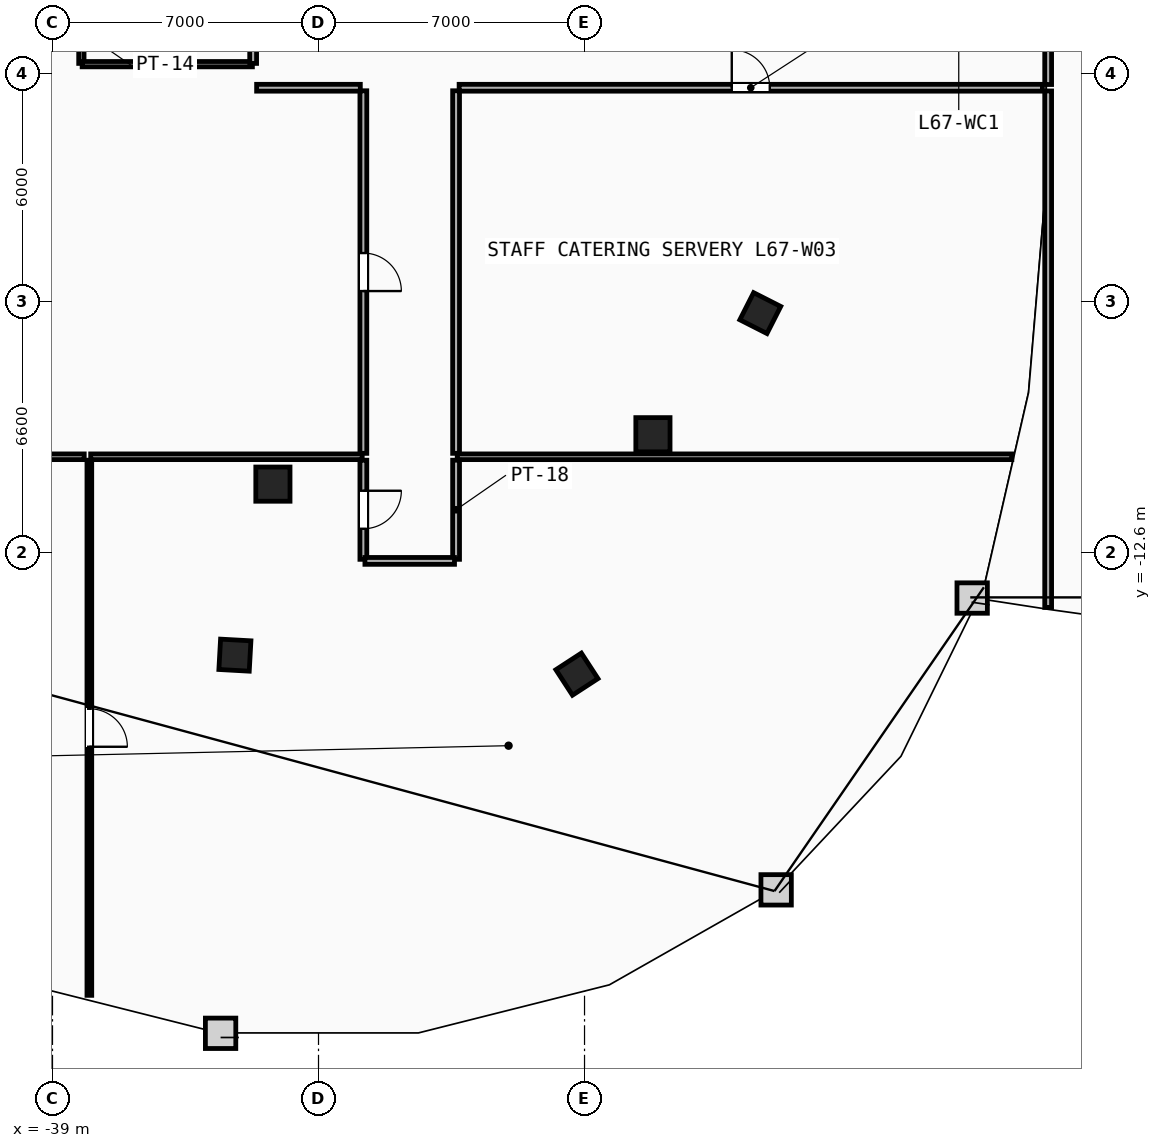
"""IFC4 building model, lengths in metres.
Left out: names, types, materials, properties, quantities, classifications, styles, units other than length and angle.
Written with IfcOpenShell. Run it as: python <this file> out.ifc"""

import sys

from ifc_helpers import new_model, si_unit, direction, frame, frame_2d, origin, origin_2d, place, context, subcontext, project, spatial, rectangle, extrude, element, fill, save


model = new_model("IFC4")
c1 = context("Model", 3, precision=1e-05, world=origin(), true_north=direction((0.0, 1.0)))
c2 = subcontext(c1, "Body", "Model", "MODEL_VIEW")
j1 = project(units=[si_unit("LENGTHUNIT", "METRE"), si_unit("PLANEANGLEUNIT", "RADIAN")], contexts=[c1])
p1 = place(None, origin())
s1 = spatial("IfcSite", under=j1, at=p1, CompositionType="ELEMENT")
p2 = place(p1, origin())
s2 = spatial("IfcBuilding", under=s1, at=p2, CompositionType="ELEMENT")
p3 = place(p2, frame((0.0, 0.0, 254.0)))
s3 = spatial("IfcBuildingStorey", under=s2, at=p3, CompositionType="ELEMENT", Elevation=254.0)
for number, where, z_axis, x_axis in (
    (1, (-33.2, -10.8, 0.0), (0.0, 0.0, 1.0), (1.0, 0.0, 0.0)),
    (2, (-23.2, -9.5, 0.0), (0.0, 0.0, 1.0), (1.0, 0.0, 0.0)),
):
    element("IfcColumn", number, at=place(p3, frame(where, z_axis=z_axis, x_axis=x_axis)), inside=s3, PredefinedType="COLUMN", context=c2, shape_type="SweptSolid", body=[
        extrude(rectangle(XDim=0.9, YDim=0.9, at=origin_2d()), origin(), (0.0, 0.0, 1.0), 3.6),
    ])
for number, where, z_axis, x_axis in (
    (3, (-34.2, -15.3, 0.0), (0.0, 0.0, 1.0), (0.998, -0.055, 0.0)),
    (4, (-25.2, -15.8, 0.0), (0.0, 0.0, 1.0), (0.838, 0.546, 0.0)),
    (5, (-20.375, -6.3, 0.0), (0.0, 0.0, 1.0), (0.453, 0.892, 0.0)),
):
    element("IfcColumn", number, at=place(p3, frame(where, z_axis=z_axis, x_axis=x_axis)), inside=s3, PredefinedType="COLUMN", context=c2, shape_type="SweptSolid", body=[
        extrude(rectangle(XDim=0.8, YDim=0.8, at=origin_2d()), origin(), (0.0, 0.0, 1.0), 3.6),
    ])
p4 = place(p3, frame((-38.24, 0.27, 0.0), z_axis=(0.0, 0.0, 1.0), x_axis=(0.0, 1.0, 0.0)))
e6 = element("IfcWall", 6, at=p4, inside=s3, PredefinedType="PARTITIONING", context=c2, shape_type="SweptSolid", body=[
    extrude(rectangle(XDim=1.715, YDim=0.14, at=frame_2d((0.857, 0.0))), origin(), (0.0, 0.0, 1.0), 3.34),
])
p5 = place(p3, frame((-38.22, 0.25, 0.0), z_axis=(0.0, 0.0, 1.0), x_axis=(1.0, 0.0, 0.0)))
e7 = element("IfcWall", 7, at=p5, inside=s3, PredefinedType="PARTITIONING", context=c2, shape_type="SweptSolid", body=[
    extrude(rectangle(XDim=4.48, YDim=0.14, at=frame_2d((2.24, 0.0))), origin(), (0.0, 0.0, 1.0), 3.34),
])
p6 = place(p3, frame((-33.72, 0.27, 0.0), z_axis=(0.0, 0.0, 1.0), x_axis=(0.0, 1.0, 0.0)))
e8 = element("IfcWall", 8, at=p6, inside=s3, PredefinedType="PARTITIONING", context=c2, shape_type="SweptSolid", body=[
    extrude(rectangle(XDim=4.26, YDim=0.18, at=frame_2d((2.13, 0.0))), origin(), (0.0, 0.0, 1.0), 3.34),
])
p7 = place(p6, frame((1.655, 0.0, 0.0)))
e9 = element("IfcOpeningElement", 9, at=p7, cuts=e8, PredefinedType="OPENING", context=c2, shape_type="SweptSolid", body=[
    extrude(rectangle(XDim=0.95, YDim=2.1, at=frame_2d((0.475, 1.05))), frame((0.0, 0.1, 0.0), z_axis=(0.0, -1.0, 0.0), x_axis=(1.0, 0.0, 0.0)), (0.0, 0.0, 1.0), 0.2),
])
p8 = place(p3, frame((-50.245, -10.08, 0.0), z_axis=(0.0, 0.0, 1.0), x_axis=(1.0, 0.0, 0.0)))
e10 = element("IfcWall", 10, at=p8, inside=s3, PredefinedType="PARTITIONING", context=c2, shape_type="SweptSolid", body=[
    extrude(rectangle(XDim=12.08, YDim=0.15, at=frame_2d((6.04, 0.0))), origin(), (0.0, 0.0, 1.0), 2.724),
])
p9 = place(p3, frame((-37.995, -10.08, 0.0), z_axis=(0.0, 0.0, 1.0), x_axis=(1.0, 0.0, 0.0)))
e11 = element("IfcWall", 11, at=p9, inside=s3, PredefinedType="PARTITIONING", context=c2, shape_type="SweptSolid", body=[
    extrude(rectangle(XDim=7.145, YDim=0.15, at=frame_2d((3.573, 0.0))), origin(), (0.0, 0.0, 1.0), 2.724),
])
p10 = place(p3, frame((-28.35, -10.08, 0.0), z_axis=(0.0, 0.0, 1.0), x_axis=(1.0, 0.0, 0.0)))
e12 = element("IfcWall", 12, at=p10, inside=s3, PredefinedType="PARTITIONING", context=c2, shape_type="SweptSolid", body=[
    extrude(rectangle(XDim=14.595, YDim=0.15, at=frame_2d((7.297, 0.0))), origin(), (0.0, 0.0, 1.0), 2.724),
])
p11 = place(p3, frame((-30.82, -10.17, 0.0), z_axis=(0.0, 0.0, 1.0), x_axis=(0.0, -1.0, 0.0)))
e13 = element("IfcWall", 13, at=p11, inside=s3, PredefinedType="PARTITIONING", context=c2, shape_type="SweptSolid", body=[
    extrude(rectangle(XDim=2.609, YDim=0.18, at=frame_2d((1.304, 0.0))), origin(), (0.0, 0.0, 1.0), 3.34),
])
p12 = place(p11, frame((0.804, 0.0, 0.0)))
e14 = element("IfcOpeningElement", 14, at=p12, cuts=e13, PredefinedType="OPENING", context=c2, shape_type="SweptSolid", body=[
    extrude(rectangle(XDim=1.0, YDim=2.15, at=frame_2d((0.5, 1.075))), frame((0.0, 0.1, 0.0), z_axis=(0.0, -1.0, 0.0), x_axis=(1.0, 0.0, 0.0)), (0.0, 0.0, 1.0), 0.2),
])
p13 = place(p3, frame((-28.38, -12.779, 0.0), z_axis=(0.0, 0.0, 1.0), x_axis=(0.0, 1.0, 0.0)))
e15 = element("IfcWall", 15, at=p13, inside=s3, PredefinedType="PARTITIONING", context=c2, shape_type="SweptSolid", body=[
    extrude(rectangle(XDim=2.609, YDim=0.18, at=frame_2d((1.304, 0.0))), origin(), (0.0, 0.0, 1.0), 3.34),
])
p14 = place(p3, frame((-30.779, -12.82, 0.0), z_axis=(0.0, 0.0, 1.0), x_axis=(1.0, 0.0, 0.0)))
e16 = element("IfcWall", 16, at=p14, inside=s3, PredefinedType="PARTITIONING", context=c2, shape_type="SweptSolid", body=[
    extrude(rectangle(XDim=2.357, YDim=0.18, at=frame_2d((1.179, 0.0))), origin(), (0.0, 0.0, 1.0), 3.34),
])
p15 = place(p3, frame((-28.3, -0.37, 0.0), z_axis=(0.0, 0.0, 1.0), x_axis=(1.0, 0.0, 0.0)))
e17 = element("IfcWall", 17, at=p15, inside=s3, PredefinedType="PARTITIONING", context=c2, shape_type="SweptSolid", body=[
    extrude(rectangle(XDim=15.349, YDim=0.18, at=frame_2d((7.675, 0.0))), origin(), (0.0, 0.0, 1.0), 3.34),
])
p16 = place(p15, frame((7.175, 0.0, 0.0)))
e18 = element("IfcOpeningElement", 18, at=p16, cuts=e17, PredefinedType="OPENING", context=c2, shape_type="SweptSolid", body=[
    extrude(rectangle(XDim=1.0, YDim=2.15, at=frame_2d((0.5, 1.075))), frame((0.0, 0.1, 0.0), z_axis=(0.0, -1.0, 0.0), x_axis=(1.0, 0.0, 0.0)), (0.0, 0.0, 1.0), 0.2),
])
p17 = place(p3, frame((-28.38, -9.99, 0.0), z_axis=(0.0, 0.0, 1.0), x_axis=(0.0, 1.0, 0.0)))
e19 = element("IfcWall", 19, at=p17, inside=s3, PredefinedType="PARTITIONING", context=c2, shape_type="SweptSolid", body=[
    extrude(rectangle(XDim=9.54, YDim=0.18, at=frame_2d((4.77, 0.0))), origin(), (0.0, 0.0, 1.0), 3.34),
])
p18 = place(p3, frame((-30.82, -0.45, 0.0), z_axis=(0.0, 0.0, 1.0), x_axis=(0.0, -1.0, 0.0)))
e20 = element("IfcWall", 20, at=p18, inside=s3, PredefinedType="PARTITIONING", context=c2, shape_type="SweptSolid", body=[
    extrude(rectangle(XDim=9.54, YDim=0.18, at=frame_2d((4.77, 0.0))), origin(), (0.0, 0.0, 1.0), 3.34),
])
p19 = place(p18, frame((4.27, 0.0, 0.0)))
e21 = element("IfcOpeningElement", 21, at=p19, cuts=e20, PredefinedType="OPENING", context=c2, shape_type="SweptSolid", body=[
    extrude(rectangle(XDim=1.0, YDim=2.15, at=frame_2d((0.5, 1.075))), frame((0.0, 0.1, 0.0), z_axis=(0.0, -1.0, 0.0), x_axis=(1.0, 0.0, 0.0)), (0.0, 0.0, 1.0), 0.2),
])
p20 = place(p3, frame((-33.628, -0.37, 0.0), z_axis=(0.0, 0.0, 1.0), x_axis=(1.0, 0.0, 0.0)))
e22 = element("IfcWall", 22, at=p20, inside=s3, PredefinedType="PARTITIONING", context=c2, shape_type="SweptSolid", body=[
    extrude(rectangle(XDim=2.729, YDim=0.18, at=frame_2d((1.364, 0.0))), origin(), (0.0, 0.0, 1.0), 3.34),
])
p21 = place(p3, frame((-38.03, -10.17, 0.0), z_axis=(0.0, 0.0, 1.0), x_axis=(0.0, -1.0, 0.0)))
e23 = element("IfcWall", 23, at=p21, inside=s3, PredefinedType="PARTITIONING", context=c2, shape_type="SweptSolid", body=[
    extrude(rectangle(XDim=14.081, YDim=0.125, at=frame_2d((7.041, 0.0))), origin(), (0.0, 0.0, 1.0), 3.34),
])
p22 = place(p21, frame((6.541, 0.0, 0.0)))
e24 = element("IfcOpeningElement", 24, at=p22, cuts=e23, PredefinedType="OPENING", context=c2, shape_type="SweptSolid", body=[
    extrude(rectangle(XDim=1.0, YDim=2.15, at=frame_2d((0.5, 1.075))), frame((0.0, 0.073, 0.0), z_axis=(0.0, -1.0, 0.0), x_axis=(1.0, 0.0, 0.0)), (0.0, 0.0, 1.0), 0.145),
])
p23 = place(p3, frame((-12.8, -14.044, 0.0), z_axis=(0.0, 0.0, 1.0), x_axis=(0.0, 1.0, 0.0)))
e25 = element("IfcWall", 25, at=p23, inside=s3, PredefinedType="PARTITIONING", context=c2, shape_type="SweptSolid", body=[
    extrude(rectangle(XDim=13.589, YDim=0.18, at=frame_2d((6.794, 0.0))), origin(), (0.0, 0.0, 1.0), 3.34),
])
p24 = place(p3, frame((-12.8, -0.285, 0.0), z_axis=(0.0, 0.0, 1.0), x_axis=(0.0, 1.0, 0.0)))
e26 = element("IfcWall", 26, at=p24, inside=s3, PredefinedType="PARTITIONING", context=c2, shape_type="SweptSolid", body=[
    extrude(rectangle(XDim=1.445, YDim=0.18, at=frame_2d((0.722, 0.0))), origin(), (0.0, 0.0, 1.0), 3.34),
])
p25 = place(p16, origin())
e27 = element("IfcDoor", 27, at=p25, inside=s3, OperationType="SINGLE_SWING_LEFT", PredefinedType="DOOR", context=c2, shape_type="SweptSolid", body=[
    extrude(rectangle(XDim=1.0, YDim=2.15, at=frame_2d((0.5, 1.075))), frame((0.0, 0.025, 0.0), z_axis=(0.0, -1.0, 0.0), x_axis=(1.0, 0.0, 0.0)), (0.0, 0.0, 1.0), 0.05),
])
fill(e18, e27)
p26 = place(p22, origin())
e28 = element("IfcDoor", 28, at=p26, inside=s3, OperationType="SINGLE_SWING_RIGHT", PredefinedType="DOOR", context=c2, shape_type="SweptSolid", body=[
    extrude(rectangle(XDim=1.0, YDim=2.15, at=frame_2d((0.5, 1.075))), frame((0.0, 0.025, 0.0), z_axis=(0.0, -1.0, 0.0), x_axis=(1.0, 0.0, 0.0)), (0.0, 0.0, 1.0), 0.05),
])
fill(e24, e28)
p27 = place(p19, origin())
e29 = element("IfcDoor", 29, at=p27, inside=s3, OperationType="SINGLE_SWING_RIGHT", PredefinedType="DOOR", context=c2, shape_type="SweptSolid", body=[
    extrude(rectangle(XDim=1.0, YDim=2.15, at=frame_2d((0.5, 1.075))), frame((0.0, 0.025, 0.0), z_axis=(0.0, -1.0, 0.0), x_axis=(1.0, 0.0, 0.0)), (0.0, 0.0, 1.0), 0.05),
])
fill(e21, e29)
p28 = place(p12, origin())
e30 = element("IfcDoor", 30, at=p28, inside=s3, OperationType="SINGLE_SWING_LEFT", PredefinedType="DOOR", context=c2, shape_type="SweptSolid", body=[
    extrude(rectangle(XDim=1.0, YDim=2.15, at=frame_2d((0.5, 1.075))), frame((0.0, 0.025, 0.0), z_axis=(0.0, -1.0, 0.0), x_axis=(1.0, 0.0, 0.0)), (0.0, 0.0, 1.0), 0.05),
])
fill(e14, e30)
save(model, sys.argv[1])
